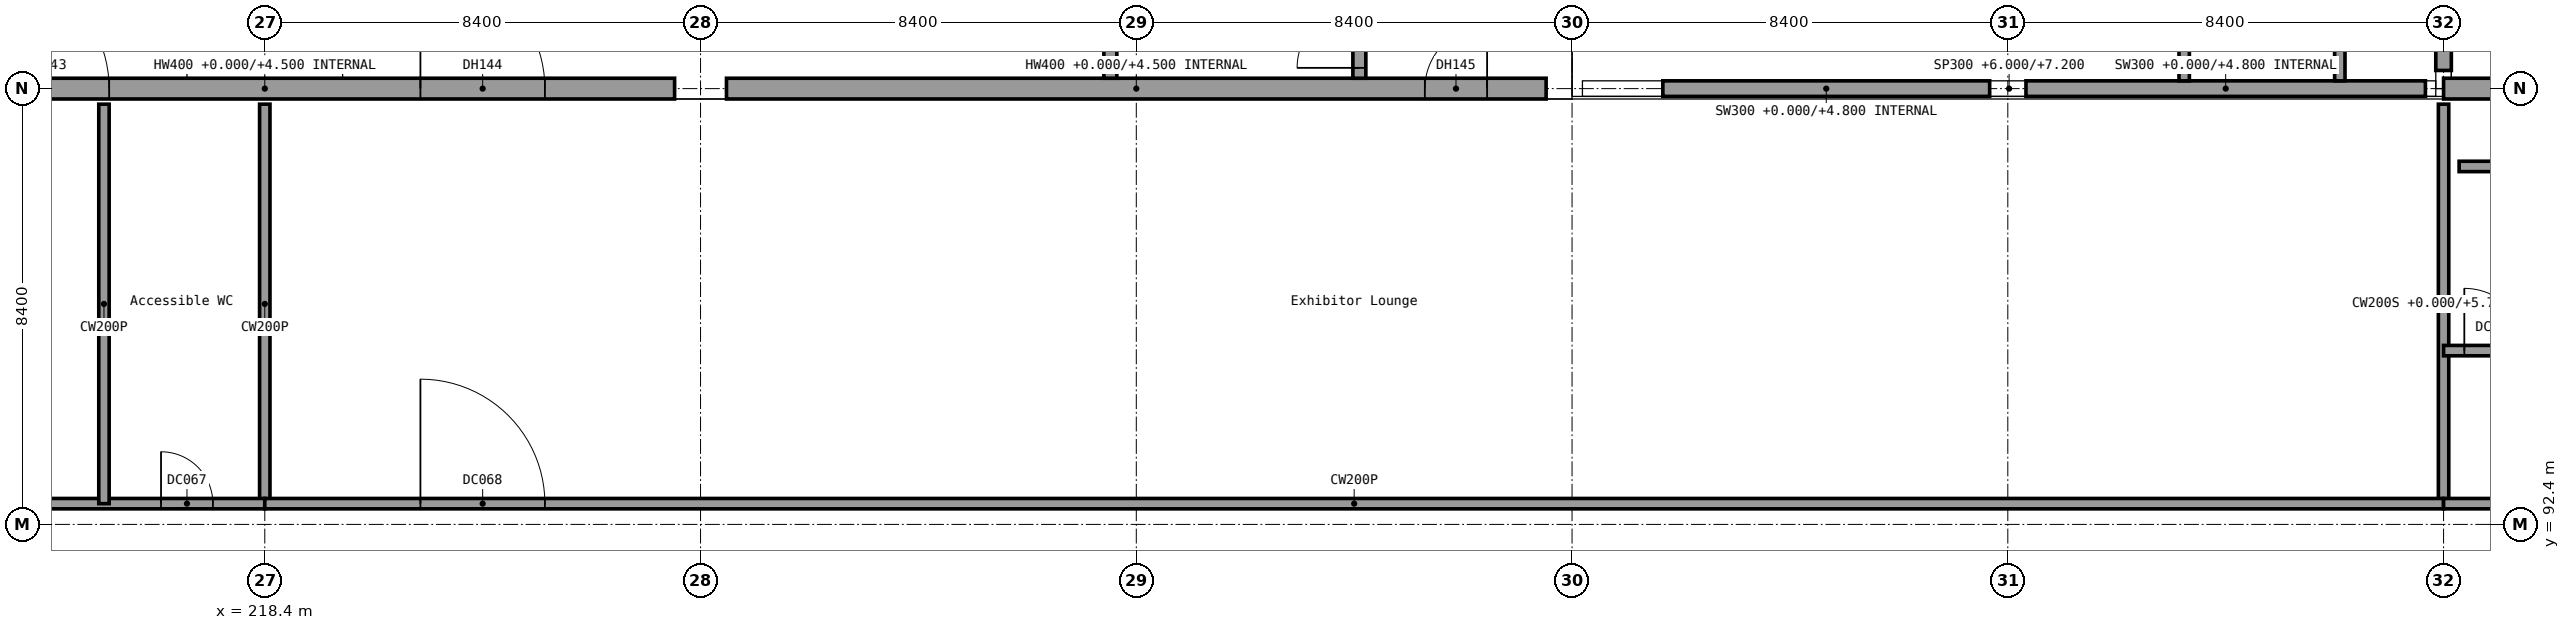
"""IFC4 building model, lengths in metres.
Left out: names, types, materials, properties, quantities, classifications, styles, units other than length and angle.
Written with IfcOpenShell. Run it as: python <this file> out.ifc"""

import sys

from ifc_helpers import new_model, si_unit, direction, frame, frame_2d, origin, origin_2d, place, context, subcontext, project, spatial, rectangle, extrude, element, fill, save


model = new_model("IFC4")
c1 = context("Model", 3, precision=1e-05, world=origin(), true_north=direction((0.0, 1.0)))
c2 = subcontext(c1, "Body", "Model", "MODEL_VIEW")
j1 = project(units=[si_unit("LENGTHUNIT", "METRE"), si_unit("PLANEANGLEUNIT", "RADIAN")], contexts=[c1])
p1 = place(None, origin())
s1 = spatial("IfcSite", under=j1, at=p1, CompositionType="ELEMENT")
p2 = place(p1, origin())
s2 = spatial("IfcBuilding", under=s1, at=p2, CompositionType="ELEMENT")
p3 = place(p2, origin())
s3 = spatial("IfcBuildingStorey", under=s2, at=p3, CompositionType="ELEMENT", Elevation=0.0)
for number, where, z_axis, x_axis in (
    (1, (226.8, 100.8, 0.0), (0.0, 0.0, 1.0), (1.0, 0.0, 0.0)),
    (2, (243.6, 100.8, 0.0), (0.0, 0.0, 1.0), (1.0, 0.0, 0.0)),
):
    element("IfcColumn", number, at=place(p3, frame(where, z_axis=z_axis, x_axis=x_axis)), inside=s3, PredefinedType="COLUMN", context=c2, shape_type="SweptSolid", body=[
        extrude(rectangle(XDim=1.0, YDim=1.6, at=origin_2d()), origin(), (0.0, 0.0, 1.0), 6.0),
    ])
for number, where, z_axis, x_axis in (
    (3, (245.0, 100.8, 0.0), (0.0, 0.0, 1.0), (1.0, 0.0, 0.0)),
    (4, (252.0, 100.8, 0.0), (0.0, 0.0, 1.0), (1.0, 0.0, 0.0)),
    (5, (260.4, 100.8, 0.0), (0.0, 0.0, 1.0), (1.0, 0.0, 0.0)),
):
    element("IfcColumn", number, at=place(p3, frame(where, z_axis=z_axis, x_axis=x_axis)), inside=s3, PredefinedType="COLUMN", context=c2, shape_type="SweptSolid", body=[
        extrude(rectangle(XDim=0.7, YDim=0.7, at=origin_2d()), origin(), (0.0, 0.0, 1.0), 4.8),
    ])
p4 = place(p3, frame((210.5, 100.8, 0.0), z_axis=(0.0, 0.0, 1.0), x_axis=(1.0, 0.0, 0.0)))
e6 = element("IfcWall", 6, at=p4, inside=s3, PredefinedType="STANDARD", context=c2, shape_type="SweptSolid", body=[
    extrude(rectangle(XDim=15.8, YDim=0.4, at=frame_2d((7.9, 0.0))), origin(), (0.0, 0.0, 1.0), 4.5),
])
p5 = place(p4, frame((2.5, 0.0, 0.0)))
e7 = element("IfcOpeningElement", 7, at=p5, cuts=e6, PredefinedType="OPENING", context=c2, shape_type="SweptSolid", body=[
    extrude(rectangle(XDim=2.4, YDim=2.4, at=frame_2d((1.2, 1.2))), frame((0.0, 0.2, 0.0), z_axis=(0.0, -1.0, 0.0), x_axis=(1.0, 0.0, 0.0)), (0.0, 0.0, 1.0), 0.4),
])
p6 = place(p4, frame((10.9, 0.0, 0.0)))
e8 = element("IfcOpeningElement", 8, at=p6, cuts=e6, PredefinedType="OPENING", context=c2, shape_type="SweptSolid", body=[
    extrude(rectangle(XDim=2.4, YDim=2.4, at=frame_2d((1.2, 1.2))), frame((0.0, 0.2, 0.0), z_axis=(0.0, -1.0, 0.0), x_axis=(1.0, 0.0, 0.0)), (0.0, 0.0, 1.0), 0.4),
])
p7 = place(p3, frame((227.3, 100.8, 0.0), z_axis=(0.0, 0.0, 1.0), x_axis=(1.0, 0.0, 0.0)))
e9 = element("IfcWall", 9, at=p7, inside=s3, PredefinedType="STANDARD", context=c2, shape_type="SweptSolid", body=[
    extrude(rectangle(XDim=15.8, YDim=0.4, at=frame_2d((7.9, 0.0))), origin(), (0.0, 0.0, 1.0), 4.5),
])
p8 = place(p7, frame((13.462, 0.0, 0.0)))
e10 = element("IfcOpeningElement", 10, at=p8, cuts=e9, PredefinedType="OPENING", context=c2, shape_type="SweptSolid", body=[
    extrude(rectangle(XDim=1.2, YDim=2.1, at=frame_2d((0.6, 1.05))), frame((0.0, 0.2, 0.0), z_axis=(0.0, -1.0, 0.0), x_axis=(1.0, 0.0, 0.0)), (0.0, 0.0, 1.0), 0.4),
])
p9 = place(p3, frame((245.35, 100.8, 0.0), z_axis=(0.0, 0.0, 1.0), x_axis=(1.0, 0.0, 0.0)))
e11 = element("IfcWall", 11, at=p9, inside=s3, PredefinedType="SOLIDWALL", context=c2, shape_type="SweptSolid", body=[
    extrude(rectangle(XDim=6.3, YDim=0.3, at=frame_2d((3.15, 0.0))), origin(), (0.0, 0.0, 1.0), 4.8),
])
p10 = place(p3, frame((252.35, 100.8, 0.0), z_axis=(0.0, 0.0, 1.0), x_axis=(1.0, 0.0, 0.0)))
e12 = element("IfcWall", 12, at=p10, inside=s3, PredefinedType="SOLIDWALL", context=c2, shape_type="SweptSolid", body=[
    extrude(rectangle(XDim=7.7, YDim=0.3, at=frame_2d((3.85, 0.0))), origin(), (0.0, 0.0, 1.0), 4.8),
])
p11 = place(p3, frame((260.4, 101.15, 0.0), z_axis=(0.0, 0.0, 1.0), x_axis=(0.0, 1.0, 0.0)))
e13 = element("IfcWall", 13, at=p11, inside=s3, PredefinedType="SOLIDWALL", context=c2, shape_type="SweptSolid", body=[
    extrude(rectangle(XDim=7.7, YDim=0.3, at=frame_2d((3.85, 0.0))), origin(), (0.0, 0.0, 1.0), 5.7),
])
p12 = place(p3, frame((243.8, 100.8, 6.0), z_axis=(0.0, 0.0, 1.0), x_axis=(1.0, 0.0, 0.0)))
e14 = element("IfcWall", 14, at=p12, inside=s3, PredefinedType="PARAPET", context=c2, shape_type="SweptSolid", body=[
    extrude(rectangle(XDim=16.45, YDim=0.3, at=frame_2d((8.225, 0.0))), origin(), (0.0, 0.0, 1.0), 1.2),
])
p13 = place(p3, frame((260.4, 100.8, 6.0), z_axis=(0.0, 0.0, 1.0), x_axis=(0.0, 1.0, 0.0)))
e15 = element("IfcWall", 15, at=p13, inside=s3, PredefinedType="PARAPET", context=c2, shape_type="SweptSolid", body=[
    extrude(rectangle(XDim=100.8, YDim=0.3, at=frame_2d((50.4, 0.0))), origin(), (0.0, 0.0, 1.0), 1.2),
])
p14 = place(p3, frame((239.5, 101.0, 0.0), z_axis=(0.0, 0.0, 1.0), x_axis=(0.0, 1.0, 0.0)))
e16 = element("IfcWall", 16, at=p14, inside=s3, PredefinedType="SHEAR", context=c2, shape_type="SweptSolid", body=[
    extrude(rectangle(XDim=8.2, YDim=0.25, at=frame_2d((4.1, 0.0))), origin(), (0.0, 0.0, 1.0), 5.7),
])
p15 = place(p14, frame((0.2, 0.0, 0.0)))
e17 = element("IfcOpeningElement", 17, at=p15, cuts=e16, PredefinedType="OPENING", context=c2, shape_type="SweptSolid", body=[
    extrude(rectangle(XDim=1.2, YDim=2.1, at=frame_2d((0.6, 1.05))), frame((0.0, 0.125, 0.0), z_axis=(0.0, -1.0, 0.0), x_axis=(1.0, 0.0, 0.0)), (0.0, 0.0, 1.0), 0.25),
])
p16 = place(p3, frame((234.7, 101.0, 0.0), z_axis=(0.0, 0.0, 1.0), x_axis=(0.0, 1.0, 0.0)))
e18 = element("IfcWall", 18, at=p16, inside=s3, PredefinedType="SHEAR", context=c2, shape_type="SweptSolid", body=[
    extrude(rectangle(XDim=8.2, YDim=0.25, at=frame_2d((4.1, 0.0))), origin(), (0.0, 0.0, 1.0), 5.7),
])
p17 = place(p16, frame((2.0, 0.0, 0.0)))
e19 = element("IfcOpeningElement", 19, at=p17, cuts=e18, PredefinedType="OPENING", context=c2, shape_type="SweptSolid", body=[
    extrude(rectangle(XDim=1.2, YDim=2.1, at=frame_2d((0.6, 1.05))), frame((0.0, 0.125, 0.0), z_axis=(0.0, -1.0, 0.0), x_axis=(1.0, 0.0, 0.0)), (0.0, 0.0, 1.0), 0.25),
])
p18 = place(p3, frame((255.4, 100.95, 0.0), z_axis=(0.0, 0.0, 1.0), x_axis=(0.0, 1.0, 0.0)))
e20 = element("IfcWall", 20, at=p18, inside=s3, PredefinedType="PARTITIONING", context=c2, shape_type="SweptSolid", body=[
    extrude(rectangle(XDim=71.25, YDim=0.2, at=frame_2d((35.625, 0.0))), origin(), (0.0, 0.0, 1.0), 4.8),
])
p19 = place(p18, frame((11.825, 0.0, 0.0)))
e21 = element("IfcOpeningElement", 21, at=p19, cuts=e20, PredefinedType="OPENING", context=c2, shape_type="SweptSolid", body=[
    extrude(rectangle(XDim=1.2, YDim=2.1, at=frame_2d((0.6, 1.05))), frame((0.0, 0.1, 0.0), z_axis=(0.0, -1.0, 0.0), x_axis=(1.0, 0.0, 0.0)), (0.0, 0.0, 1.0), 0.2),
])
p20 = place(p18, frame((30.65, 0.0, 0.0)))
e22 = element("IfcOpeningElement", 22, at=p20, cuts=e20, PredefinedType="OPENING", context=c2, shape_type="SweptSolid", body=[
    extrude(rectangle(XDim=1.2, YDim=2.1, at=frame_2d((0.6, 1.05))), frame((0.0, 0.1, 0.0), z_axis=(0.0, -1.0, 0.0), x_axis=(1.0, 0.0, 0.0)), (0.0, 0.0, 1.0), 0.2),
])
p21 = place(p18, frame((47.45, 0.0, 0.0)))
e23 = element("IfcOpeningElement", 23, at=p21, cuts=e20, PredefinedType="OPENING", context=c2, shape_type="SweptSolid", body=[
    extrude(rectangle(XDim=1.2, YDim=2.1, at=frame_2d((0.6, 1.05))), frame((0.0, 0.1, 0.0), z_axis=(0.0, -1.0, 0.0), x_axis=(1.0, 0.0, 0.0)), (0.0, 0.0, 1.0), 0.2),
])
p22 = place(p18, frame((64.25, 0.0, 0.0)))
e24 = element("IfcOpeningElement", 24, at=p22, cuts=e20, PredefinedType="OPENING", context=c2, shape_type="SweptSolid", body=[
    extrude(rectangle(XDim=1.2, YDim=2.1, at=frame_2d((0.6, 1.05))), frame((0.0, 0.1, 0.0), z_axis=(0.0, -1.0, 0.0), x_axis=(1.0, 0.0, 0.0)), (0.0, 0.0, 1.0), 0.2),
])
p23 = place(p3, frame((258.4, 100.95, 0.0), z_axis=(0.0, 0.0, 1.0), x_axis=(0.0, 1.0, 0.0)))
e25 = element("IfcWall", 25, at=p23, inside=s3, PredefinedType="PARTITIONING", context=c2, shape_type="SweptSolid", body=[
    extrude(rectangle(XDim=4.05, YDim=0.2, at=frame_2d((2.025, 0.0))), origin(), (0.0, 0.0, 1.0), 4.8),
])
for number, where, z_axis, x_axis in (
    (26, (218.4, 92.4, 0.0), (0.0, 0.0, 1.0), (1.0, 0.0, 0.0)),
    (27, (226.8, 92.4, 0.0), (0.0, 0.0, 1.0), (1.0, 0.0, 0.0)),
    (28, (235.2, 92.4, 0.0), (0.0, 0.0, 1.0), (1.0, 0.0, 0.0)),
    (29, (243.6, 92.4, 0.0), (0.0, 0.0, 1.0), (1.0, 0.0, 0.0)),
    (30, (252.0, 92.4, 0.0), (0.0, 0.0, 1.0), (1.0, 0.0, 0.0)),
    (31, (260.4, 92.4, 0.0), (0.0, 0.0, 1.0), (1.0, 0.0, 0.0)),
    (32, (218.4, 99.6, 0.0), (0.0, 0.0, 1.0), (1.0, 0.0, 0.0)),
    (33, (226.8, 99.6, 0.0), (0.0, 0.0, 1.0), (1.0, 0.0, 0.0)),
    (34, (235.2, 99.6, 0.0), (0.0, 0.0, 1.0), (1.0, 0.0, 0.0)),
    (35, (243.6, 99.6, 0.0), (0.0, 0.0, 1.0), (1.0, 0.0, 0.0)),
    (36, (252.0, 99.6, 0.0), (0.0, 0.0, 1.0), (1.0, 0.0, 0.0)),
    (37, (260.4, 99.6, 0.0), (0.0, 0.0, 1.0), (1.0, 0.0, 0.0)),
):
    element("IfcColumn", number, at=place(p3, frame(where, z_axis=z_axis, x_axis=x_axis)), inside=s3, PredefinedType="COLUMN", context=c2, shape_type="SweptSolid", body=[
        extrude(rectangle(XDim=0.6, YDim=0.6, at=origin_2d()), origin(), (0.0, 0.0, 1.0), 6.0),
    ])
p24 = place(p3, frame((260.4, 100.5, 0.0), z_axis=(0.0, 0.0, 1.0), x_axis=(0.0, -1.0, 0.0)))
e38 = element("IfcWall", 38, at=p24, inside=s3, PredefinedType="SOLIDWALL", context=c2, shape_type="SweptSolid", body=[
    extrude(rectangle(XDim=7.7, YDim=0.2, at=frame_2d((3.85, 0.0))), origin(), (0.0, 0.0, 1.0), 5.7),
])
p25 = place(p3, frame((260.7, 99.3, 0.0), z_axis=(0.0, 0.0, 1.0), x_axis=(1.0, 0.0, 0.0)))
e39 = element("IfcWall", 39, at=p25, inside=s3, PredefinedType="SOLIDWALL", context=c2, shape_type="SweptSolid", body=[
    extrude(rectangle(XDim=7.8, YDim=0.2, at=frame_2d((3.9, 0.0))), origin(), (0.0, 0.0, 1.0), 5.1),
])
p26 = place(p3, frame((260.4, 100.8, 0.0), z_axis=(0.0, 0.0, 1.0), x_axis=(1.0, 0.0, 0.0)))
e40 = element("IfcWall", 40, at=p26, inside=s3, PredefinedType="SOLIDWALL", context=c2, shape_type="SweptSolid", body=[
    extrude(rectangle(XDim=8.85, YDim=0.4, at=frame_2d((4.425, 0.0))), origin(), (0.0, 0.0, 1.0), 5.7),
])
p27 = place(p26, frame((3.225, 0.0, 1.0)))
e41 = element("IfcOpeningElement", 41, at=p27, cuts=e40, PredefinedType="OPENING", context=c2, shape_type="SweptSolid", body=[
    extrude(rectangle(XDim=2.4, YDim=2.4, at=frame_2d((1.2, 1.2))), frame((0.0, 0.2, 0.0), z_axis=(0.0, -1.0, 0.0), x_axis=(1.0, 0.0, 0.0)), (0.0, 0.0, 1.0), 0.4),
])
p28 = place(p3, frame((218.4, 100.5, 0.0), z_axis=(0.0, 0.0, 1.0), x_axis=(0.0, -1.0, 0.0)))
e42 = element("IfcWall", 42, at=p28, inside=s3, PredefinedType="PARTITIONING", context=c2, shape_type="SweptSolid", body=[
    extrude(rectangle(XDim=7.7, YDim=0.2, at=frame_2d((3.85, 0.0))), origin(), (0.0, 0.0, 1.0), 5.7),
])
p29 = place(p3, frame((201.6, 92.8, 0.0), z_axis=(0.0, 0.0, 1.0), x_axis=(1.0, 0.0, 0.0)))
e43 = element("IfcWall", 43, at=p29, inside=s3, PredefinedType="PARTITIONING", context=c2, shape_type="SweptSolid", body=[
    extrude(rectangle(XDim=16.8, YDim=0.2, at=frame_2d((8.4, 0.0))), origin(), (0.0, 0.0, 1.0), 5.7),
])
p30 = place(p29, frame((3.3, 0.0, 0.0)))
e44 = element("IfcOpeningElement", 44, at=p30, cuts=e43, PredefinedType="OPENING", context=c2, shape_type="SweptSolid", body=[
    extrude(rectangle(XDim=1.8, YDim=2.4, at=frame_2d((0.9, 1.2))), frame((0.0, 0.1, 0.0), z_axis=(0.0, -1.0, 0.0), x_axis=(1.0, 0.0, 0.0)), (0.0, 0.0, 1.0), 0.2),
])
p31 = place(p29, frame((14.8, 0.0, 0.0)))
e45 = element("IfcOpeningElement", 45, at=p31, cuts=e43, PredefinedType="OPENING", context=c2, shape_type="SweptSolid", body=[
    extrude(rectangle(XDim=1.0, YDim=2.4, at=frame_2d((0.5, 1.2))), frame((0.0, 0.1, 0.0), z_axis=(0.0, -1.0, 0.0), x_axis=(1.0, 0.0, 0.0)), (0.0, 0.0, 1.0), 0.2),
])
p32 = place(p3, frame((215.3, 100.5, 0.0), z_axis=(0.0, 0.0, 1.0), x_axis=(0.0, -1.0, 0.0)))
e46 = element("IfcWall", 46, at=p32, inside=s3, PredefinedType="PARTITIONING", context=c2, shape_type="SweptSolid", body=[
    extrude(rectangle(XDim=7.7, YDim=0.2, at=frame_2d((3.85, 0.0))), origin(), (0.0, 0.0, 1.0), 5.7),
])
p33 = place(p3, frame((218.4, 92.8, 0.0), z_axis=(0.0, 0.0, 1.0), x_axis=(1.0, 0.0, 0.0)))
e47 = element("IfcWall", 47, at=p33, inside=s3, PredefinedType="PARTITIONING", context=c2, shape_type="SweptSolid", body=[
    extrude(rectangle(XDim=42.0, YDim=0.2, at=frame_2d((21.0, 0.0))), origin(), (0.0, 0.0, 1.0), 5.7),
])
p34 = place(p33, frame((3.0, 0.0, 0.0)))
e48 = element("IfcOpeningElement", 48, at=p34, cuts=e47, PredefinedType="OPENING", context=c2, shape_type="SweptSolid", body=[
    extrude(rectangle(XDim=2.4, YDim=2.4, at=frame_2d((1.2, 1.2))), frame((0.0, 0.1, 0.0), z_axis=(0.0, -1.0, 0.0), x_axis=(1.0, 0.0, 0.0)), (0.0, 0.0, 1.0), 0.2),
])
p35 = place(p3, frame((260.4, 92.8, 0.0), z_axis=(0.0, 0.0, 1.0), x_axis=(1.0, 0.0, 0.0)))
e49 = element("IfcWall", 49, at=p35, inside=s3, PredefinedType="SOLIDWALL", context=c2, shape_type="SweptSolid", body=[
    extrude(rectangle(XDim=8.4, YDim=0.2, at=frame_2d((4.2, 0.0))), origin(), (0.0, 0.0, 1.0), 5.7),
])
p36 = place(p35, frame((1.2, 0.0, 0.0)))
e50 = element("IfcOpeningElement", 50, at=p36, cuts=e49, PredefinedType="OPENING", context=c2, shape_type="SweptSolid", body=[
    extrude(rectangle(XDim=2.4, YDim=2.4, at=frame_2d((1.2, 1.2))), frame((0.0, 0.1, 0.0), z_axis=(0.0, -1.0, 0.0), x_axis=(1.0, 0.0, 0.0)), (0.0, 0.0, 1.0), 0.2),
])
p37 = place(p3, frame((260.4, 95.75, 0.0), z_axis=(0.0, 0.0, 1.0), x_axis=(1.0, 0.0, 0.0)))
e51 = element("IfcWall", 51, at=p37, inside=s3, PredefinedType="SOLIDWALL", context=c2, shape_type="SweptSolid", body=[
    extrude(rectangle(XDim=8.4, YDim=0.2, at=frame_2d((4.2, 0.0))), origin(), (0.0, 0.0, 1.0), 5.7),
])
p38 = place(p37, frame((0.4, 0.0, 0.0)))
e52 = element("IfcOpeningElement", 52, at=p38, cuts=e51, PredefinedType="OPENING", context=c2, shape_type="SweptSolid", body=[
    extrude(rectangle(XDim=1.2, YDim=2.4, at=frame_2d((0.6, 1.2))), frame((0.0, 0.1, 0.0), z_axis=(0.0, -1.0, 0.0), x_axis=(1.0, 0.0, 0.0)), (0.0, 0.0, 1.0), 0.2),
])
p39 = place(p5, origin())
e53 = element("IfcDoor", 53, at=p39, inside=s3, OperationType="DOUBLE_DOOR_SINGLE_SWING", PredefinedType="DOOR", context=c2, shape_type="SweptSolid", body=[
    extrude(rectangle(XDim=2.4, YDim=2.4, at=frame_2d((1.2, 1.2))), frame((0.0, 0.025, 0.0), z_axis=(0.0, -1.0, 0.0), x_axis=(1.0, 0.0, 0.0)), (0.0, 0.0, 1.0), 0.05),
])
fill(e7, e53)
p40 = place(p6, origin())
e54 = element("IfcDoor", 54, at=p40, inside=s3, OperationType="DOUBLE_DOOR_SINGLE_SWING", PredefinedType="DOOR", context=c2, shape_type="SweptSolid", body=[
    extrude(rectangle(XDim=2.4, YDim=2.4, at=frame_2d((1.2, 1.2))), frame((0.0, 0.025, 0.0), z_axis=(0.0, -1.0, 0.0), x_axis=(1.0, 0.0, 0.0)), (0.0, 0.0, 1.0), 0.05),
])
fill(e8, e54)
p41 = place(p8, origin())
e55 = element("IfcDoor", 55, at=p41, inside=s3, OperationType="SINGLE_SWING_RIGHT", PredefinedType="DOOR", context=c2, shape_type="SweptSolid", body=[
    extrude(rectangle(XDim=1.2, YDim=2.1, at=frame_2d((0.6, 1.05))), frame((0.0, 0.025, 0.0), z_axis=(0.0, -1.0, 0.0), x_axis=(1.0, 0.0, 0.0)), (0.0, 0.0, 1.0), 0.05),
])
fill(e10, e55)
p42 = place(p15, origin())
e56 = element("IfcDoor", 56, at=p42, inside=s3, OperationType="SINGLE_SWING_LEFT", PredefinedType="DOOR", context=c2, shape_type="SweptSolid", body=[
    extrude(rectangle(XDim=1.2, YDim=2.1, at=frame_2d((0.6, 1.05))), frame((0.0, 0.025, 0.0), z_axis=(0.0, -1.0, 0.0), x_axis=(1.0, 0.0, 0.0)), (0.0, 0.0, 1.0), 0.05),
])
fill(e17, e56)
p43 = place(p31, origin())
e57 = element("IfcDoor", 57, at=p43, inside=s3, OperationType="SINGLE_SWING_LEFT", PredefinedType="DOOR", context=c2, shape_type="SweptSolid", body=[
    extrude(rectangle(XDim=1.0, YDim=2.4, at=frame_2d((0.5, 1.2))), frame((0.0, 0.025, 0.0), z_axis=(0.0, -1.0, 0.0), x_axis=(1.0, 0.0, 0.0)), (0.0, 0.0, 1.0), 0.05),
])
fill(e45, e57)
p44 = place(p34, origin())
e58 = element("IfcDoor", 58, at=p44, inside=s3, OperationType="DOUBLE_DOOR_DOUBLE_SWING", PredefinedType="DOOR", context=c2, shape_type="SweptSolid", body=[
    extrude(rectangle(XDim=2.4, YDim=2.4, at=frame_2d((1.2, 1.2))), frame((0.0, 0.025, 0.0), z_axis=(0.0, -1.0, 0.0), x_axis=(1.0, 0.0, 0.0)), (0.0, 0.0, 1.0), 0.05),
])
fill(e48, e58)
p45 = place(p38, origin())
e59 = element("IfcDoor", 59, at=p45, inside=s3, OperationType="SINGLE_SWING_LEFT", PredefinedType="DOOR", context=c2, shape_type="SweptSolid", body=[
    extrude(rectangle(XDim=1.2, YDim=2.4, at=frame_2d((0.6, 1.2))), frame((0.0, 0.025, 0.0), z_axis=(0.0, -1.0, 0.0), x_axis=(1.0, 0.0, 0.0)), (0.0, 0.0, 1.0), 0.05),
])
fill(e52, e59)
save(model, sys.argv[1])
